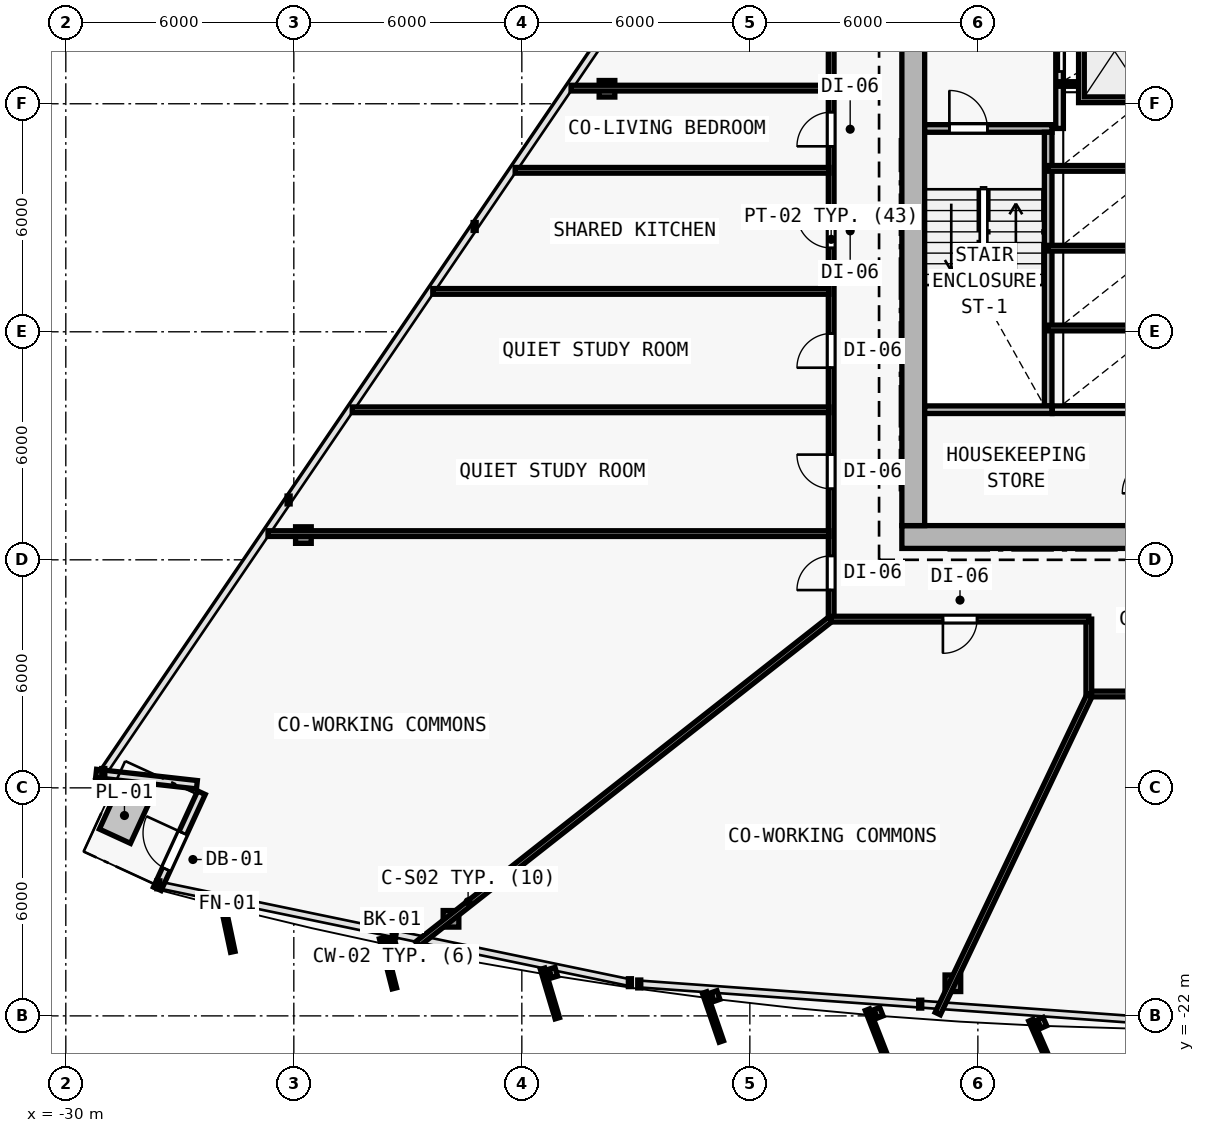
"""IFC4 building model, lengths in metres.
Left out: names, types, materials, properties, quantities, classifications, styles, units other than length and angle.
Written with IfcOpenShell. Run it as: python <this file> out.ifc"""

import sys

from ifc_helpers import new_model, si_unit, direction, frame, frame_2d, origin, origin_2d, place, context, subcontext, project, spatial, rectangle, i_section, extrude, element, fill, save


model = new_model("IFC4")
c1 = context("Model", 3, precision=1e-05, world=origin(), true_north=direction((0.0, 1.0)))
c2 = subcontext(c1, "Body", "Model", "MODEL_VIEW")
j1 = project(units=[si_unit("LENGTHUNIT", "METRE"), si_unit("PLANEANGLEUNIT", "RADIAN")], contexts=[c1])
p1 = place(None, origin())
s1 = spatial("IfcSite", under=j1, at=p1, CompositionType="ELEMENT")
p2 = place(p1, origin())
s2 = spatial("IfcBuilding", under=s1, at=p2, CompositionType="ELEMENT")
p3 = place(p2, frame((0.0, 0.0, 51.6)))
s3 = spatial("IfcBuildingStorey", under=s2, at=p3, CompositionType="ELEMENT", Elevation=51.6)
for number, where, z_axis, x_axis in (
    (1, (-7.7, -9.4, 0.0), (0.0, 0.0, 1.0), (1.0, 0.0, 0.0)),
    (2, (-7.7, 2.0, 0.0), (0.0, 0.0, 1.0), (1.0, 0.0, 0.0)),
):
    element("IfcColumn", number, at=place(p3, frame(where, z_axis=z_axis, x_axis=x_axis)), inside=s3, PredefinedType="COLUMN", context=c2, shape_type="SweptSolid", body=[
        extrude(i_section(OverallWidth=0.416, OverallDepth=0.446, WebThickness=0.025, FlangeThickness=0.04, FilletRadius=0.015, at=origin_2d()), origin(), (0.0, 0.0, 1.0), 3.6),
    ])
p4 = place(p3, frame((-19.864, -19.446, 0.005), z_axis=(0.020594893987, 0.033509183946, 0.999226193078), x_axis=(-0.851954850327, 0.523615252838, 0.0)))
e3 = element("IfcColumn", 3, at=p4, inside=s3, PredefinedType="COLUMN", context=c2, shape_type="SweptSolid", body=[
    extrude(i_section(OverallWidth=0.412, OverallDepth=0.435, WebThickness=0.023, FlangeThickness=0.037, FilletRadius=0.015, at=origin_2d()), origin(), (0.0, 0.0, 1.0), 3.592),
])
p5 = place(p3, frame((-6.657, -21.142, 0.005), z_axis=(0.00693381708, 0.03528089279, 0.999353381334), x_axis=(-0.981229659911, 0.192842823335, 0.0)))
e4 = element("IfcColumn", 4, at=p5, inside=s3, PredefinedType="COLUMN", context=c2, shape_type="SweptSolid", body=[
    extrude(i_section(OverallWidth=0.412, OverallDepth=0.435, WebThickness=0.023, FlangeThickness=0.037, FilletRadius=0.015, at=origin_2d()), origin(), (0.0, 0.0, 1.0), 3.592),
])
p6 = place(p3, frame((-15.759, 2.394, 0.005), z_axis=(0.017002405671, 0.009589356798, 0.999809463067), x_axis=(-0.491253415567, 0.871016694268, 0.0)))
e5 = element("IfcColumn", 5, at=p6, inside=s3, PredefinedType="COLUMN", context=c2, shape_type="SweptSolid", body=[
    extrude(i_section(OverallWidth=0.412, OverallDepth=0.435, WebThickness=0.023, FlangeThickness=0.037, FilletRadius=0.015, at=origin_2d()), origin(), (0.0, 0.0, 1.0), 3.59),
])
p7 = place(p3, frame((-23.748, -9.349, 0.005), z_axis=(0.025290391274, 0.021619205444, 0.999446349768), x_axis=(-0.649781149204, 0.760121344352, 0.0)))
e6 = element("IfcColumn", 6, at=p7, inside=s3, PredefinedType="COLUMN", context=c2, shape_type="SweptSolid", body=[
    extrude(i_section(OverallWidth=0.412, OverallDepth=0.435, WebThickness=0.023, FlangeThickness=0.037, FilletRadius=0.015, at=origin_2d()), origin(), (0.0, 0.0, 1.0), 3.591),
])
p8 = place(p3, frame((-26.55, -15.918, 0.0), z_axis=(0.0, 0.0, 1.0), x_axis=(-0.993824465748, 0.110963648468, 0.0)))
e7 = element("IfcWall", 7, at=p8, inside=s3, PredefinedType="SOLIDWALL", context=c2, shape_type="SweptSolid", body=[
    extrude(rectangle(XDim=2.669, YDim=0.22, at=frame_2d((1.334, 0.0))), origin(), (0.0, 0.0, 1.0), 3.35),
])
p9 = place(p3, frame((-27.593, -18.656, 0.0), z_axis=(0.0, 0.0, 1.0), x_axis=(0.417515840695, 0.908669644463, 0.0)))
e8 = element("IfcWall", 8, at=p9, inside=s3, PredefinedType="SOLIDWALL", context=c2, shape_type="SweptSolid", body=[
    extrude(rectangle(XDim=2.782, YDim=0.22, at=frame_2d((1.391, 0.0))), origin(), (0.0, 0.0, 1.0), 3.35),
])
p10 = place(p9, frame((0.566, 0.0, 0.0)))
e9 = element("IfcOpeningElement", 9, at=p10, cuts=e8, PredefinedType="OPENING", context=c2, shape_type="SweptSolid", body=[
    extrude(rectangle(XDim=1.05, YDim=2.15, at=frame_2d((0.525, 1.075))), frame((0.0, 0.12, 0.0), z_axis=(0.0, -1.0, 0.0), x_axis=(1.0, 0.0, 0.0)), (0.0, 0.0, 1.0), 0.24),
])
p11 = place(p3, frame((-8.0, -9.4, 0.0), z_axis=(0.0, 0.0, 1.0), x_axis=(1.0, 0.0, 0.0)))
e10 = element("IfcWall", 10, at=p11, inside=s3, PredefinedType="SHEAR", context=c2, shape_type="SweptSolid", body=[
    extrude(rectangle(XDim=16.0, YDim=0.6, at=frame_2d((8.0, 0.0))), origin(), (0.0, 0.0, 1.0), 3.35),
])
p12 = place(p11, frame((9.65, 0.0, 0.0)))
e11 = element("IfcOpeningElement", 11, at=p12, cuts=e10, PredefinedType="OPENING", context=c2, shape_type="SweptSolid", body=[
    extrude(rectangle(XDim=1.5, YDim=2.2, at=frame_2d((0.75, 1.1))), frame((0.0, 0.31, 0.0), z_axis=(0.0, -1.0, 0.0), x_axis=(1.0, 0.0, 0.0)), (0.0, 0.0, 1.0), 0.62),
])
p13 = place(p3, frame((-7.7, -9.1, 0.0), z_axis=(0.0, 0.0, 1.0), x_axis=(0.0, 1.0, 0.0)))
e12 = element("IfcWall", 12, at=p13, inside=s3, PredefinedType="SHEAR", context=c2, shape_type="SweptSolid", body=[
    extrude(rectangle(XDim=19.0, YDim=0.6, at=frame_2d((9.5, 0.0))), origin(), (0.0, 0.0, 1.0), 3.35),
])
p14 = place(p13, frame((12.65, 0.0, 0.0)))
e13 = element("IfcOpeningElement", 13, at=p14, cuts=e12, PredefinedType="OPENING", context=c2, shape_type="SweptSolid", body=[
    extrude(rectangle(XDim=1.1, YDim=2.15, at=frame_2d((0.55, 1.075))), frame((0.0, 0.31, 0.0), z_axis=(0.0, -1.0, 0.0), x_axis=(1.0, 0.0, 0.0)), (0.0, 0.0, 1.0), 0.62),
])
p15 = place(p3, frame((-7.4, 1.35, 0.0), z_axis=(0.0, 0.0, 1.0), x_axis=(1.0, 0.0, 0.0)))
e14 = element("IfcWall", 14, at=p15, inside=s3, PredefinedType="SOLIDWALL", context=c2, shape_type="SweptSolid", body=[
    extrude(rectangle(XDim=3.35, YDim=0.2, at=frame_2d((1.675, 0.0))), origin(), (0.0, 0.0, 1.0), 3.35),
])
p16 = place(p15, frame((0.65, 0.0, 0.0)))
e15 = element("IfcOpeningElement", 15, at=p16, cuts=e14, PredefinedType="OPENING", context=c2, shape_type="SweptSolid", body=[
    extrude(rectangle(XDim=1.0, YDim=2.15, at=frame_2d((0.5, 1.075))), frame((0.0, 0.11, 0.0), z_axis=(0.0, -1.0, 0.0), x_axis=(1.0, 0.0, 0.0)), (0.0, 0.0, 1.0), 0.22),
])
p17 = place(p3, frame((-4.15, -5.95, 0.0), z_axis=(0.0, 0.0, 1.0), x_axis=(0.0, 1.0, 0.0)))
e16 = element("IfcWall", 16, at=p17, inside=s3, PredefinedType="SOLIDWALL", context=c2, shape_type="SweptSolid", body=[
    extrude(rectangle(XDim=7.2, YDim=0.2, at=frame_2d((3.6, 0.0))), origin(), (0.0, 0.0, 1.0), 3.35),
])
p18 = place(p3, frame((-3.85, 1.35, 0.0), z_axis=(0.0, 0.0, 1.0), x_axis=(0.0, 1.0, 0.0)))
e17 = element("IfcWall", 17, at=p18, inside=s3, PredefinedType="SOLIDWALL", context=c2, shape_type="SweptSolid", body=[
    extrude(rectangle(XDim=8.545, YDim=0.2, at=frame_2d((4.272, 0.0))), origin(), (0.0, 0.0, 1.0), 3.35),
])
p19 = place(p18, frame((1.5, 0.0, 0.0)))
e18 = element("IfcOpeningElement", 18, at=p19, cuts=e17, PredefinedType="OPENING", context=c2, shape_type="SweptSolid", body=[
    extrude(rectangle(XDim=1.0, YDim=2.15, at=frame_2d((0.5, 1.075))), frame((0.0, 0.11, 0.0), z_axis=(0.0, -1.0, 0.0), x_axis=(1.0, 0.0, 0.0)), (0.0, 0.0, 1.0), 0.22),
])
p20 = place(p18, frame((3.18, 0.0, 0.0)))
e19 = element("IfcOpeningElement", 19, at=p20, cuts=e17, PredefinedType="OPENING", context=c2, shape_type="SweptSolid", body=[
    extrude(rectangle(XDim=1.0, YDim=2.15, at=frame_2d((0.5, 1.075))), frame((0.0, 0.11, 0.0), z_axis=(0.0, -1.0, 0.0), x_axis=(1.0, 0.0, 0.0)), (0.0, 0.0, 1.0), 0.22),
])
p21 = place(p3, frame((-3.85, 2.52, 0.0), z_axis=(0.0, 0.0, 1.0), x_axis=(1.0, 0.0, 0.0)))
e20 = element("IfcWall", 20, at=p21, inside=s3, PredefinedType="PARTITIONING", context=c2, shape_type="SweptSolid", body=[
    extrude(rectangle(XDim=2.9, YDim=0.12, at=frame_2d((1.45, 0.0))), origin(), (0.0, 0.0, 1.0), 3.35),
])
for number, where, z_axis, x_axis in (
    (21, (-4.15, -3.9, 0.0), (0.0, 0.0, 1.0), (1.0, 0.0, 0.0)),
    (22, (-4.15, -1.8, 0.0), (0.0, 0.0, 1.0), (1.0, 0.0, 0.0)),
    (23, (-4.15, 0.3, 0.0), (0.0, 0.0, 1.0), (1.0, 0.0, 0.0)),
):
    element("IfcWall", number, at=place(p3, frame(where, z_axis=z_axis, x_axis=x_axis)), inside=s3, PredefinedType="PARTITIONING", context=c2, shape_type="SweptSolid", body=[
        extrude(rectangle(XDim=2.9, YDim=0.15, at=frame_2d((1.45, 0.0))), origin(), (0.0, 0.0, 1.0), 3.35),
    ])
p22 = place(p3, frame((-7.4, -6.05, 0.0), z_axis=(0.0, 0.0, 1.0), x_axis=(1.0, 0.0, 0.0)))
e24 = element("IfcWall", 24, at=p22, inside=s3, PredefinedType="SOLIDWALL", context=c2, shape_type="SweptSolid", body=[
    extrude(rectangle(XDim=3.35, YDim=0.2, at=frame_2d((1.675, 0.0))), origin(), (0.0, 0.0, 1.0), 3.35),
])
p23 = place(p3, frame((-4.04, -6.05, 0.0), z_axis=(0.0, 0.0, 1.0), x_axis=(1.0, 0.0, 0.0)))
e25 = element("IfcWall", 25, at=p23, inside=s3, PredefinedType="SOLIDWALL", context=c2, shape_type="SweptSolid", body=[
    extrude(rectangle(XDim=2.79, YDim=0.2, at=frame_2d((1.395, 0.0))), origin(), (0.0, 0.0, 1.0), 3.35),
])
p24 = place(p3, frame((-9.86, -11.56, 0.0), z_axis=(0.0, 0.0, 1.0), x_axis=(0.0, 1.0, 0.0)))
e26 = element("IfcWall", 26, at=p24, inside=s3, PredefinedType="PARTITIONING", context=c2, shape_type="SweptSolid", body=[
    extrude(rectangle(XDim=19.986, YDim=0.15, at=frame_2d((9.993, 0.0))), origin(), (0.0, 0.0, 1.0), 2.609),
])
p25 = place(p24, frame((9.766, 0.0, 0.0)))
e27 = element("IfcOpeningElement", 27, at=p25, cuts=e26, PredefinedType="OPENING", context=c2, shape_type="SweptSolid", body=[
    extrude(rectangle(XDim=0.9, YDim=2.1, at=frame_2d((0.45, 1.05))), frame((0.0, 0.085, 0.0), z_axis=(0.0, -1.0, 0.0), x_axis=(1.0, 0.0, 0.0)), (0.0, 0.0, 1.0), 0.17),
])
p26 = place(p24, frame((6.615, 0.0, 0.0)))
e28 = element("IfcOpeningElement", 28, at=p26, cuts=e26, PredefinedType="OPENING", context=c2, shape_type="SweptSolid", body=[
    extrude(rectangle(XDim=0.9, YDim=2.1, at=frame_2d((0.45, 1.05))), frame((0.0, 0.085, 0.0), z_axis=(0.0, -1.0, 0.0), x_axis=(1.0, 0.0, 0.0)), (0.0, 0.0, 1.0), 0.17),
])
p27 = place(p24, frame((3.428, 0.0, 0.0)))
e29 = element("IfcOpeningElement", 29, at=p27, cuts=e26, PredefinedType="OPENING", context=c2, shape_type="SweptSolid", body=[
    extrude(rectangle(XDim=0.9, YDim=2.1, at=frame_2d((0.45, 1.05))), frame((0.0, 0.085, 0.0), z_axis=(0.0, -1.0, 0.0), x_axis=(1.0, 0.0, 0.0)), (0.0, 0.0, 1.0), 0.17),
])
p28 = place(p24, frame((0.764, 0.0, 0.0)))
e30 = element("IfcOpeningElement", 30, at=p28, cuts=e26, PredefinedType="OPENING", context=c2, shape_type="SweptSolid", body=[
    extrude(rectangle(XDim=0.9, YDim=2.1, at=frame_2d((0.45, 1.05))), frame((0.0, 0.085, 0.0), z_axis=(0.0, -1.0, 0.0), x_axis=(1.0, 0.0, 0.0)), (0.0, 0.0, 1.0), 0.17),
])
p29 = place(p24, frame((12.44, 0.0, 0.0)))
e31 = element("IfcOpeningElement", 31, at=p29, cuts=e26, PredefinedType="OPENING", context=c2, shape_type="SweptSolid", body=[
    extrude(rectangle(XDim=0.9, YDim=2.1, at=frame_2d((0.45, 1.05))), frame((0.0, 0.085, 0.0), z_axis=(0.0, -1.0, 0.0), x_axis=(1.0, 0.0, 0.0)), (0.0, 0.0, 1.0), 0.17),
])
p30 = place(p3, frame((3.08, -13.53, 0.0), z_axis=(0.0, 0.0, 1.0), x_axis=(-1.0, 0.0, 0.0)))
e32 = element("IfcWall", 32, at=p30, inside=s3, PredefinedType="PARTITIONING", context=c2, shape_type="SweptSolid", body=[
    extrude(rectangle(XDim=6.16, YDim=0.15, at=frame_2d((3.08, 0.0))), origin(), (0.0, 0.0, 1.0), 2.725),
])
p31 = place(p3, frame((-3.08, -13.53, 0.0), z_axis=(0.0, 0.0, 1.0), x_axis=(0.0, 1.0, 0.0)))
e33 = element("IfcWall", 33, at=p31, inside=s3, PredefinedType="PARTITIONING", context=c2, shape_type="SweptSolid", body=[
    extrude(rectangle(XDim=1.97, YDim=0.15, at=frame_2d((0.985, 0.0))), origin(), (0.0, 0.0, 1.0), 2.995),
])
p32 = place(p3, frame((-3.08, -11.56, 0.0), z_axis=(0.0, 0.0, 1.0), x_axis=(-1.0, 0.0, 0.0)))
e34 = element("IfcWall", 34, at=p32, inside=s3, PredefinedType="PARTITIONING", context=c2, shape_type="SweptSolid", body=[
    extrude(rectangle(XDim=6.78, YDim=0.15, at=frame_2d((3.39, 0.0))), origin(), (0.0, 0.0, 1.0), 2.725),
])
p33 = place(p32, frame((2.94, 0.0, 0.0)))
e35 = element("IfcOpeningElement", 35, at=p33, cuts=e34, PredefinedType="OPENING", context=c2, shape_type="SweptSolid", body=[
    extrude(rectangle(XDim=0.9, YDim=2.1, at=frame_2d((0.45, 1.05))), frame((0.0, 0.085, 0.0), z_axis=(0.0, -1.0, 0.0), x_axis=(1.0, 0.0, 0.0)), (0.0, 0.0, 1.0), 0.17),
])
p34 = place(p3, frame((-9.888, -11.569, 0.0), z_axis=(0.0, 0.0, 1.0), x_axis=(-0.785986505804, -0.61824365156, 0.0)))
e36 = element("IfcWall", 36, at=p34, inside=s3, PredefinedType="PARTITIONING", context=c2, shape_type="SweptSolid", body=[
    extrude(rectangle(XDim=13.817, YDim=0.15, at=frame_2d((6.908, 0.0))), origin(), (0.0, 0.0, 1.0), 2.725),
])
p35 = place(p3, frame((-3.066, -13.573, 0.0), z_axis=(0.0, 0.0, 1.0), x_axis=(-0.430425314069, -0.902626195614, 0.0)))
e37 = element("IfcWall", 37, at=p35, inside=s3, PredefinedType="PARTITIONING", context=c2, shape_type="SweptSolid", body=[
    extrude(rectangle(XDim=9.269, YDim=0.15, at=frame_2d((4.634, 0.0))), origin(), (0.0, 0.0, 1.0), 2.725),
])
p36 = place(p3, frame((-9.92, 2.411, 0.0), z_axis=(0.0, 0.0, 1.0), x_axis=(-1.0, 0.0, 0.0)))
e38 = element("IfcWall", 38, at=p36, inside=s3, PredefinedType="PARTITIONING", context=c2, shape_type="SweptSolid", body=[
    extrude(rectangle(XDim=6.785, YDim=0.15, at=frame_2d((3.392, 0.0))), origin(), (0.0, 0.0, 1.0), 2.725),
])
p37 = place(p3, frame((-9.92, -9.31, 0.0), z_axis=(0.0, 0.0, 1.0), x_axis=(-1.0, 0.0, 0.0)))
e39 = element("IfcWall", 39, at=p37, inside=s3, PredefinedType="PARTITIONING", context=c2, shape_type="SweptSolid", body=[
    extrude(rectangle(XDim=14.759, YDim=0.15, at=frame_2d((7.379, 0.0))), origin(), (0.0, 0.0, 1.0), 2.609),
])
p38 = place(p3, frame((-9.92, -2.938, 0.0), z_axis=(0.0, 0.0, 1.0), x_axis=(-1.0, 0.0, 0.0)))
e40 = element("IfcWall", 40, at=p38, inside=s3, PredefinedType="PARTITIONING", context=c2, shape_type="SweptSolid", body=[
    extrude(rectangle(XDim=10.423, YDim=0.15, at=frame_2d((5.212, 0.0))), origin(), (0.0, 0.0, 1.0), 2.735),
])
p39 = place(p3, frame((-9.92, 0.249, 0.0), z_axis=(0.0, 0.0, 1.0), x_axis=(-1.0, 0.0, 0.0)))
e41 = element("IfcWall", 41, at=p39, inside=s3, PredefinedType="PARTITIONING", context=c2, shape_type="SweptSolid", body=[
    extrude(rectangle(XDim=8.256, YDim=0.15, at=frame_2d((4.128, 0.0))), origin(), (0.0, 0.0, 1.0), 2.735),
])
p40 = place(p3, frame((-9.92, -6.053, 0.0), z_axis=(0.0, 0.0, 1.0), x_axis=(-1.0, 0.0, 0.0)))
e42 = element("IfcWall", 42, at=p40, inside=s3, PredefinedType="PARTITIONING", context=c2, shape_type="SweptSolid", body=[
    extrude(rectangle(XDim=12.543, YDim=0.15, at=frame_2d((6.271, 0.0))), origin(), (0.0, 0.0, 1.0), 2.735),
])
p41 = place(p10, origin())
e43 = element("IfcDoor", 43, at=p41, inside=s3, OperationType="SINGLE_SWING_RIGHT", PredefinedType="DOOR", context=c2, shape_type="SweptSolid", body=[
    extrude(rectangle(XDim=1.05, YDim=2.15, at=frame_2d((0.525, 1.075))), frame((0.0, 0.025, 0.0), z_axis=(0.0, -1.0, 0.0), x_axis=(1.0, 0.0, 0.0)), (0.0, 0.0, 1.0), 0.05),
])
fill(e9, e43)
p42 = place(p16, origin())
e44 = element("IfcDoor", 44, at=p42, inside=s3, OperationType="SINGLE_SWING_LEFT", PredefinedType="DOOR", context=c2, shape_type="SweptSolid", body=[
    extrude(rectangle(XDim=1.0, YDim=2.15, at=frame_2d((0.5, 1.075))), frame((0.0, 0.025, 0.0), z_axis=(0.0, -1.0, 0.0), x_axis=(1.0, 0.0, 0.0)), (0.0, 0.0, 1.0), 0.05),
])
fill(e15, e44)
p43 = place(p19, origin())
e45 = element("IfcDoor", 45, at=p43, inside=s3, OperationType="DOUBLE_DOOR_SLIDING", PredefinedType="DOOR", context=c2, shape_type="SweptSolid", body=[
    extrude(rectangle(XDim=1.0, YDim=2.15, at=frame_2d((0.5, 1.075))), frame((0.0, 0.025, 0.0), z_axis=(0.0, -1.0, 0.0), x_axis=(1.0, 0.0, 0.0)), (0.0, 0.0, 1.0), 0.05),
])
fill(e18, e45)
p44 = place(p25, origin())
e46 = element("IfcDoor", 46, at=p44, inside=s3, OperationType="SINGLE_SWING_RIGHT", PredefinedType="DOOR", context=c2, shape_type="SweptSolid", body=[
    extrude(rectangle(XDim=0.9, YDim=2.1, at=frame_2d((0.45, 1.05))), frame((0.0, 0.025, 0.0), z_axis=(0.0, -1.0, 0.0), x_axis=(1.0, 0.0, 0.0)), (0.0, 0.0, 1.0), 0.05),
])
fill(e27, e46)
p45 = place(p26, origin())
e47 = element("IfcDoor", 47, at=p45, inside=s3, OperationType="SINGLE_SWING_LEFT", PredefinedType="DOOR", context=c2, shape_type="SweptSolid", body=[
    extrude(rectangle(XDim=0.9, YDim=2.1, at=frame_2d((0.45, 1.05))), frame((0.0, 0.025, 0.0), z_axis=(0.0, -1.0, 0.0), x_axis=(1.0, 0.0, 0.0)), (0.0, 0.0, 1.0), 0.05),
])
fill(e28, e47)
p46 = place(p27, origin())
e48 = element("IfcDoor", 48, at=p46, inside=s3, OperationType="SINGLE_SWING_RIGHT", PredefinedType="DOOR", context=c2, shape_type="SweptSolid", body=[
    extrude(rectangle(XDim=0.9, YDim=2.1, at=frame_2d((0.45, 1.05))), frame((0.0, 0.025, 0.0), z_axis=(0.0, -1.0, 0.0), x_axis=(1.0, 0.0, 0.0)), (0.0, 0.0, 1.0), 0.05),
])
fill(e29, e48)
p47 = place(p28, origin())
e49 = element("IfcDoor", 49, at=p47, inside=s3, OperationType="SINGLE_SWING_LEFT", PredefinedType="DOOR", context=c2, shape_type="SweptSolid", body=[
    extrude(rectangle(XDim=0.9, YDim=2.1, at=frame_2d((0.45, 1.05))), frame((0.0, 0.025, 0.0), z_axis=(0.0, -1.0, 0.0), x_axis=(1.0, 0.0, 0.0)), (0.0, 0.0, 1.0), 0.05),
])
fill(e30, e49)
p48 = place(p33, origin())
e50 = element("IfcDoor", 50, at=p48, inside=s3, OperationType="SINGLE_SWING_RIGHT", PredefinedType="DOOR", context=c2, shape_type="SweptSolid", body=[
    extrude(rectangle(XDim=0.9, YDim=2.1, at=frame_2d((0.45, 1.05))), frame((0.0, 0.025, 0.0), z_axis=(0.0, -1.0, 0.0), x_axis=(1.0, 0.0, 0.0)), (0.0, 0.0, 1.0), 0.05),
])
fill(e35, e50)
p49 = place(p29, origin())
e51 = element("IfcDoor", 51, at=p49, inside=s3, OperationType="SINGLE_SWING_LEFT", PredefinedType="DOOR", context=c2, shape_type="SweptSolid", body=[
    extrude(rectangle(XDim=0.9, YDim=2.1, at=frame_2d((0.45, 1.05))), frame((0.0, 0.025, 0.0), z_axis=(0.0, -1.0, 0.0), x_axis=(1.0, 0.0, 0.0)), (0.0, 0.0, 1.0), 0.05),
])
fill(e31, e51)
save(model, sys.argv[1])
